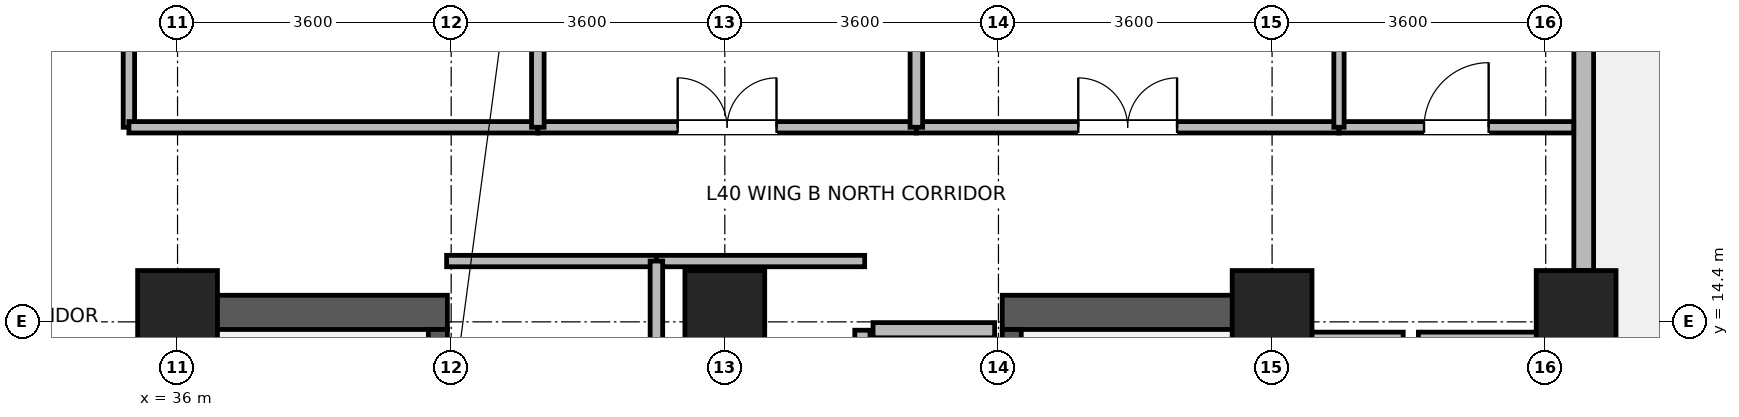
"""IFC4 building model, lengths in metres.
Left out: names, types, materials, properties, quantities, classifications, styles, units other than length and angle.
Written with IfcOpenShell. Run it as: python <this file> out.ifc"""

import sys

from ifc_helpers import new_model, si_unit, direction, frame, frame_2d, origin, origin_2d, place, context, subcontext, project, spatial, rectangle, extrude, source, transform, mapped, element, fill, save


model = new_model("IFC4")
c1 = context("Model", 3, precision=1e-05, world=origin(), true_north=direction((0.0, 1.0)))
c2 = subcontext(c1, "Body", "Model", "MODEL_VIEW")
j1 = project(units=[si_unit("LENGTHUNIT", "METRE"), si_unit("PLANEANGLEUNIT", "RADIAN")], contexts=[c1])
p1 = place(None, origin())
s1 = spatial("IfcSite", under=j1, at=p1, CompositionType="ELEMENT")
p2 = place(p1, origin())
s2 = spatial("IfcBuilding", under=s1, at=p2, CompositionType="ELEMENT")
p3 = place(p2, frame((0.0, 0.0, 158.7)))
s3 = spatial("IfcBuildingStorey", under=s2, at=p3, CompositionType="ELEMENT", Elevation=158.7)
for number, where, z_axis, x_axis in (
    (1, (36.125, 6.85, 0.0), (0.0, 0.0, 1.0), (0.0, 1.0, 0.0)),
    (2, (50.275, 6.85, 0.0), (0.0, 0.0, 1.0), (0.0, 1.0, 0.0)),
):
    element("IfcWall", number, at=place(p3, frame(where, z_axis=z_axis, x_axis=x_axis)), inside=s3, PredefinedType="SHEAR", context=c2, shape_type="SweptSolid", body=[
        extrude(rectangle(XDim=7.9, YDim=0.45, at=frame_2d((3.95, 0.0))), origin(), (0.0, 0.0, 1.0), 3.46),
    ])
for number, where, z_axis, x_axis in (
    (3, (36.35, 14.525, 0.0), (0.0, 0.0, 1.0), (1.0, 0.0, 0.0)),
    (4, (46.85, 14.525, 0.0), (0.0, 0.0, 1.0), (1.0, 0.0, 0.0)),
):
    element("IfcWall", number, at=place(p3, frame(where, z_axis=z_axis, x_axis=x_axis)), inside=s3, PredefinedType="SHEAR", context=c2, shape_type="SweptSolid", body=[
        extrude(rectangle(XDim=3.2, YDim=0.45, at=frame_2d((1.6, 0.0))), origin(), (0.0, 0.0, 1.0), 3.46),
    ])
p4 = place(p3, frame((39.425, 7.3, 0.0), z_axis=(0.0, 0.0, 1.0), x_axis=(0.0, 1.0, 0.0)))
e5 = element("IfcWall", 5, at=p4, inside=s3, PredefinedType="SHEAR", context=c2, shape_type="SweptSolid", body=[
    extrude(rectangle(XDim=7.0, YDim=0.25, at=frame_2d((3.5, 0.0))), origin(), (0.0, 0.0, 1.0), 3.46),
])
p5 = place(p4, frame((0.15, 0.0, 0.0)))
e6 = element("IfcOpeningElement", 6, at=p5, cuts=e5, PredefinedType="OPENING", context=c2, shape_type="SweptSolid", body=[
    extrude(rectangle(XDim=1.1, YDim=2.08, at=frame_2d((0.55, 1.04))), frame((0.0, 0.135, 0.0), z_axis=(0.0, -1.0, 0.0), x_axis=(1.0, 0.0, 0.0)), (0.0, 0.0, 1.0), 0.27),
])
p6 = place(p3, frame((46.975, 7.3, 0.0), z_axis=(0.0, 0.0, 1.0), x_axis=(0.0, 1.0, 0.0)))
e7 = element("IfcWall", 7, at=p6, inside=s3, PredefinedType="SHEAR", context=c2, shape_type="SweptSolid", body=[
    extrude(rectangle(XDim=7.0, YDim=0.25, at=frame_2d((3.5, 0.0))), origin(), (0.0, 0.0, 1.0), 3.46),
])
p7 = place(p6, frame((0.15, 0.0, 0.0)))
e8 = element("IfcOpeningElement", 8, at=p7, cuts=e7, PredefinedType="OPENING", context=c2, shape_type="SweptSolid", body=[
    extrude(rectangle(XDim=1.1, YDim=2.08, at=frame_2d((0.55, 1.04))), frame((0.0, 0.135, 0.0), z_axis=(0.0, -1.0, 0.0), x_axis=(1.0, 0.0, 0.0)), (0.0, 0.0, 1.0), 0.27),
])
m1 = source(origin(), c2, "Body", "SweptSolid", [
    extrude(rectangle(XDim=1.05, YDim=1.05, at=origin_2d()), origin(), (0.0, 0.0, 1.0), 3.7),
])
for number, where, z_axis, x_axis in (
    (9, (36.0, 14.55, 0.0), (0.0, 0.0, 1.0), (1.0, 0.0, 0.0)),
    (10, (43.2, 14.55, 0.0), (0.0, 0.0, 1.0), (1.0, 0.0, 0.0)),
    (11, (50.4, 14.55, 0.0), (0.0, 0.0, 1.0), (1.0, 0.0, 0.0)),
    (12, (54.4, 14.55, 0.0), (0.0, 0.0, 1.0), (1.0, 0.0, 0.0)),
):
    element("IfcColumn", number, at=place(p3, frame(where, z_axis=z_axis, x_axis=x_axis)), inside=s3, PredefinedType="COLUMN", context=c2, shape_type="MappedRepresentation", body=[
        mapped(m1, transform((0.0, 0.0, 0.0), x_axis=(1.0, 0.0, 0.0), y_axis=(0.0, 1.0, 0.0), z_axis=(0.0, 0.0, 1.0), scale=1.0)),
    ])
p8 = place(p3, frame((54.5, 21.074, 0.0), z_axis=(0.0, 0.0, 1.0), x_axis=(0.0, -1.0, 0.0)))
e13 = element("IfcWall", 13, at=p8, inside=s3, PredefinedType="STANDARD", context=c2, shape_type="SweptSolid", body=[
    extrude(rectangle(XDim=5.998, YDim=0.26, at=frame_2d((2.999, 0.0))), origin(), (0.0, 0.0, 1.0), 2.99),
])
p9 = place(p8, frame((0.6, 0.0, 0.85)))
e14 = element("IfcOpeningElement", 14, at=p9, cuts=e13, PredefinedType="OPENING", context=c2, shape_type="SweptSolid", body=[
    extrude(rectangle(XDim=1.8, YDim=1.85, at=frame_2d((0.9, 0.925))), frame((0.0, 0.14, 0.0), z_axis=(0.0, -1.0, 0.0), x_axis=(1.0, 0.0, 0.0)), (0.0, 0.0, 1.0), 0.28),
])
p10 = place(p3, frame((50.475, 14.165, 0.0), z_axis=(0.0, 0.0, 1.0), x_axis=(1.0, 0.0, 0.0)))
e15 = element("IfcWall", 15, at=p10, inside=s3, PredefinedType="PARTITIONING", context=c2, shape_type="SweptSolid", body=[
    extrude(rectangle(XDim=1.65, YDim=0.2, at=frame_2d((0.825, 0.0))), origin(), (0.0, 0.0, 1.0), 3.44),
])
p11 = place(p3, frame((52.325, 14.165, 0.0), z_axis=(0.0, 0.0, 1.0), x_axis=(1.0, 0.0, 0.0)))
e16 = element("IfcWall", 16, at=p11, inside=s3, PredefinedType="PARTITIONING", context=c2, shape_type="SweptSolid", body=[
    extrude(rectangle(XDim=1.65, YDim=0.2, at=frame_2d((0.825, 0.0))), origin(), (0.0, 0.0, 1.0), 3.44),
])
p12 = place(p3, frame((45.15, 14.29, 0.0), z_axis=(0.0, 0.0, 1.0), x_axis=(1.0, 0.0, 0.0)))
e17 = element("IfcWall", 17, at=p12, inside=s3, PredefinedType="PARTITIONING", context=c2, shape_type="SweptSolid", body=[
    extrude(rectangle(XDim=1.6, YDim=0.2, at=frame_2d((0.8, 0.0))), origin(), (0.0, 0.0, 1.0), 2.44),
])
p13 = place(p3, frame((45.01, 11.61, 0.0), z_axis=(0.0, 0.0, 1.0), x_axis=(0.0, 1.0, 0.0)))
e18 = element("IfcWall", 18, at=p13, inside=s3, PredefinedType="PARTITIONING", context=c2, shape_type="SweptSolid", body=[
    extrude(rectangle(XDim=2.68, YDim=0.2, at=frame_2d((1.34, 0.0))), origin(), (0.0, 0.0, 1.0), 3.44),
])
p14 = place(p3, frame((35.36, 16.96, 0.0), z_axis=(0.0, 0.0, 1.0), x_axis=(0.0, 1.0, 0.0)))
e19 = element("IfcWall", 19, at=p14, inside=s3, PredefinedType="PARTITIONING", context=c2, shape_type="SweptSolid", body=[
    extrude(rectangle(XDim=9.64, YDim=0.15, at=frame_2d((4.82, 0.0))), origin(), (0.0, 0.0, 1.0), 3.44),
])
p15 = place(p14, frame((2.435, 0.0, 0.0)))
e20 = element("IfcOpeningElement", 20, at=p15, cuts=e19, PredefinedType="OPENING", context=c2, shape_type="SweptSolid", body=[
    extrude(rectangle(XDim=1.3, YDim=2.12, at=frame_2d((0.65, 1.06))), frame((0.0, 0.085, 0.0), z_axis=(0.0, -1.0, 0.0), x_axis=(1.0, 0.0, 0.0)), (0.0, 0.0, 1.0), 0.17),
])
p16 = place(p3, frame((45.72, 16.96, 0.0), z_axis=(0.0, 0.0, 1.0), x_axis=(1.0, 0.0, 0.0)))
e21 = element("IfcWall", 21, at=p16, inside=s3, PredefinedType="PARTITIONING", context=c2, shape_type="SweptSolid", body=[
    extrude(rectangle(XDim=5.56, YDim=0.15, at=frame_2d((2.78, 0.0))), origin(), (0.0, 0.0, 1.0), 3.44),
])
p17 = place(p16, frame((2.13, 0.0, 0.0)))
e22 = element("IfcOpeningElement", 22, at=p17, cuts=e21, PredefinedType="OPENING", context=c2, shape_type="SweptSolid", body=[
    extrude(rectangle(XDim=1.3, YDim=2.12, at=frame_2d((0.65, 1.06))), frame((0.0, 0.085, 0.0), z_axis=(0.0, -1.0, 0.0), x_axis=(1.0, 0.0, 0.0)), (0.0, 0.0, 1.0), 0.17),
])
p18 = place(p3, frame((35.36, 16.96, 0.0), z_axis=(0.0, 0.0, 1.0), x_axis=(1.0, 0.0, 0.0)))
e23 = element("IfcWall", 23, at=p18, inside=s3, PredefinedType="PARTITIONING", context=c2, shape_type="SweptSolid", body=[
    extrude(rectangle(XDim=5.38, YDim=0.15, at=frame_2d((2.69, 0.0))), origin(), (0.0, 0.0, 1.0), 3.44),
])
p19 = place(p3, frame((40.74, 16.96, 0.0), z_axis=(0.0, 0.0, 1.0), x_axis=(1.0, 0.0, 0.0)))
e24 = element("IfcWall", 24, at=p19, inside=s3, PredefinedType="PARTITIONING", context=c2, shape_type="SweptSolid", body=[
    extrude(rectangle(XDim=4.98, YDim=0.15, at=frame_2d((2.49, 0.0))), origin(), (0.0, 0.0, 1.0), 3.44),
])
p20 = place(p19, frame((1.84, 0.0, 0.0)))
e25 = element("IfcOpeningElement", 25, at=p20, cuts=e24, PredefinedType="OPENING", context=c2, shape_type="SweptSolid", body=[
    extrude(rectangle(XDim=1.3, YDim=2.12, at=frame_2d((0.65, 1.06))), frame((0.0, 0.085, 0.0), z_axis=(0.0, -1.0, 0.0), x_axis=(1.0, 0.0, 0.0)), (0.0, 0.0, 1.0), 0.17),
])
p21 = place(p3, frame((51.28, 16.96, 0.0), z_axis=(0.0, 0.0, 1.0), x_axis=(1.0, 0.0, 0.0)))
e26 = element("IfcWall", 26, at=p21, inside=s3, PredefinedType="PARTITIONING", context=c2, shape_type="SweptSolid", body=[
    extrude(rectangle(XDim=3.088, YDim=0.15, at=frame_2d((1.544, 0.0))), origin(), (0.0, 0.0, 1.0), 3.44),
])
p22 = place(p21, frame((1.119, 0.0, 0.0)))
e27 = element("IfcOpeningElement", 27, at=p22, cuts=e26, PredefinedType="OPENING", context=c2, shape_type="SweptSolid", body=[
    extrude(rectangle(XDim=0.85, YDim=2.04, at=frame_2d((0.425, 1.02))), frame((0.0, 0.085, 0.0), z_axis=(0.0, -1.0, 0.0), x_axis=(1.0, 0.0, 0.0)), (0.0, 0.0, 1.0), 0.17),
])
p23 = place(p3, frame((39.54, 15.2, 0.0), z_axis=(0.0, 0.0, 1.0), x_axis=(1.0, 0.0, 0.0)))
e28 = element("IfcWall", 28, at=p23, inside=s3, PredefinedType="PARTITIONING", context=c2, shape_type="SweptSolid", body=[
    extrude(rectangle(XDim=2.76, YDim=0.15, at=frame_2d((1.38, 0.0))), origin(), (0.0, 0.0, 1.0), 3.44),
])
p24 = place(p3, frame((42.3, 15.2, 0.0), z_axis=(0.0, 0.0, 1.0), x_axis=(1.0, 0.0, 0.0)))
e29 = element("IfcWall", 29, at=p24, inside=s3, PredefinedType="PARTITIONING", context=c2, shape_type="SweptSolid", body=[
    extrude(rectangle(XDim=2.74, YDim=0.15, at=frame_2d((1.37, 0.0))), origin(), (0.0, 0.0, 1.0), 3.44),
])
for number, where, z_axis, x_axis in (
    (30, (40.74, 16.96, 0.0), (0.0, 0.0, 1.0), (0.0, 1.0, 0.0)),
    (31, (45.72, 16.96, 0.0), (0.0, 0.0, 1.0), (0.0, 1.0, 0.0)),
):
    element("IfcWall", number, at=place(p3, frame(where, z_axis=z_axis, x_axis=x_axis)), inside=s3, PredefinedType="PARTITIONING", context=c2, shape_type="SweptSolid", body=[
        extrude(rectangle(XDim=9.64, YDim=0.165, at=frame_2d((4.82, 0.0))), origin(), (0.0, 0.0, 1.0), 3.44),
    ])
p25 = place(p3, frame((51.28, 16.96, 0.0), z_axis=(0.0, 0.0, 1.0), x_axis=(0.0, 1.0, 0.0)))
e32 = element("IfcWall", 32, at=p25, inside=s3, PredefinedType="PARTITIONING", context=c2, shape_type="SweptSolid", body=[
    extrude(rectangle(XDim=9.64, YDim=0.135, at=frame_2d((4.82, 0.0))), origin(), (0.0, 0.0, 1.0), 3.44),
])
p26 = place(p3, frame((42.3, 11.64, 0.0), z_axis=(0.0, 0.0, 1.0), x_axis=(0.0, 1.0, 0.0)))
e33 = element("IfcWall", 33, at=p26, inside=s3, PredefinedType="PARTITIONING", context=c2, shape_type="SweptSolid", body=[
    extrude(rectangle(XDim=3.56, YDim=0.165, at=frame_2d((1.78, 0.0))), origin(), (0.0, 0.0, 1.0), 3.44),
])
p27 = place(p17, origin())
e34 = element("IfcDoor", 34, at=p27, inside=s3, OperationType="DOUBLE_DOOR_SINGLE_SWING", PredefinedType="DOOR", context=c2, shape_type="SweptSolid", body=[
    extrude(rectangle(XDim=1.3, YDim=2.12, at=frame_2d((0.65, 1.06))), frame((0.0, 0.025, 0.0), z_axis=(0.0, -1.0, 0.0), x_axis=(1.0, 0.0, 0.0)), (0.0, 0.0, 1.0), 0.05),
])
fill(e22, e34)
p28 = place(p20, origin())
e35 = element("IfcDoor", 35, at=p28, inside=s3, OperationType="DOUBLE_DOOR_SINGLE_SWING", PredefinedType="DOOR", context=c2, shape_type="SweptSolid", body=[
    extrude(rectangle(XDim=1.3, YDim=2.12, at=frame_2d((0.65, 1.06))), frame((0.0, 0.025, 0.0), z_axis=(0.0, -1.0, 0.0), x_axis=(1.0, 0.0, 0.0)), (0.0, 0.0, 1.0), 0.05),
])
fill(e25, e35)
p29 = place(p22, origin())
e36 = element("IfcDoor", 36, at=p29, inside=s3, OperationType="SINGLE_SWING_RIGHT", PredefinedType="DOOR", context=c2, shape_type="SweptSolid", body=[
    extrude(rectangle(XDim=0.85, YDim=2.04, at=frame_2d((0.425, 1.02))), frame((0.0, 0.025, 0.0), z_axis=(0.0, -1.0, 0.0), x_axis=(1.0, 0.0, 0.0)), (0.0, 0.0, 1.0), 0.05),
])
fill(e27, e36)
save(model, sys.argv[1])
